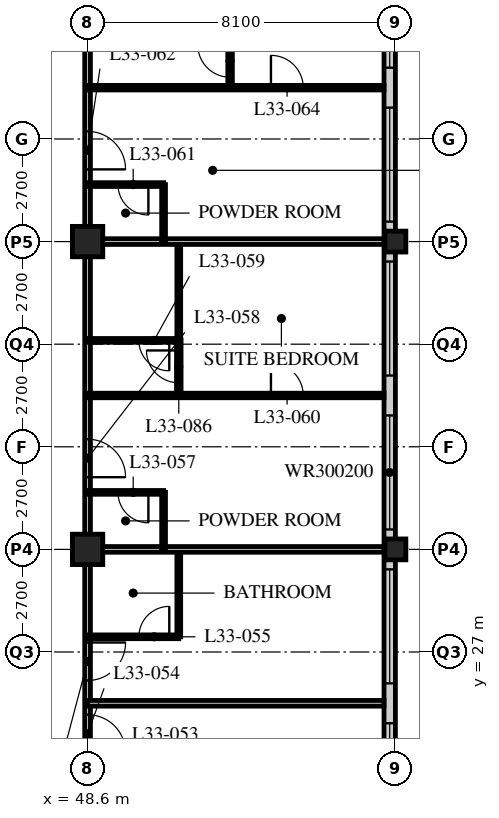
"""IFC4 building model, lengths in metres.
Left out: names, types, materials, properties, quantities, classifications, styles, units other than length and angle.
Written with IfcOpenShell. Run it as: python <this file> out.ifc"""

import sys

from ifc_helpers import new_model, si_unit, direction, frame, frame_2d, origin, origin_2d, place, context, subcontext, project, spatial, rectangle, hollow_rectangle, extrude, element, fill, save


model = new_model("IFC4")
c1 = context("Model", 3, precision=1e-05, world=origin(), true_north=direction((0.0, 1.0)))
c2 = subcontext(c1, "Body", "Model", "MODEL_VIEW")
j1 = project(units=[si_unit("LENGTHUNIT", "METRE"), si_unit("PLANEANGLEUNIT", "RADIAN")], contexts=[c1])
p1 = place(None, origin())
s1 = spatial("IfcSite", under=j1, at=p1, CompositionType="ELEMENT")
p2 = place(p1, origin())
s2 = spatial("IfcBuilding", under=s1, at=p2, CompositionType="ELEMENT")
p3 = place(p2, frame((0.0, 0.0, 130.6)))
s3 = spatial("IfcBuildingStorey", under=s2, at=p3, CompositionType="ELEMENT", Elevation=130.6)
for number, where, z_axis, x_axis in (
    (1, (48.6, 29.7, 0.0), (0.0, 0.0, 1.0), (1.0, 0.0, 0.0)),
    (2, (48.6, 37.8, 0.0), (0.0, 0.0, 1.0), (1.0, 0.0, 0.0)),
):
    element("IfcColumn", number, at=place(p3, frame(where, z_axis=z_axis, x_axis=x_axis)), inside=s3, PredefinedType="COLUMN", context=c2, shape_type="SweptSolid", body=[
        extrude(hollow_rectangle(XDim=0.8, YDim=0.8, WallThickness=0.08, at=origin_2d()), origin(), (0.0, 0.0, 1.0), 3.4),
    ])
for number, where, z_axis, x_axis in (
    (3, (56.7, 29.7, 0.0), (0.0, 0.0, 1.0), (1.0, 0.0, 0.0)),
    (4, (56.7, 37.8, 0.0), (0.0, 0.0, 1.0), (1.0, 0.0, 0.0)),
):
    element("IfcColumn", number, at=place(p3, frame(where, z_axis=z_axis, x_axis=x_axis)), inside=s3, PredefinedType="COLUMN", context=c2, shape_type="SweptSolid", body=[
        extrude(hollow_rectangle(XDim=0.55, YDim=0.55, WallThickness=0.04, at=origin_2d()), origin(), (0.0, 0.0, 1.0), 3.4),
    ])
p4 = place(p3, frame((56.55, 13.8, 0.0), z_axis=(0.0, 0.0, 1.0), x_axis=(0.0, 1.0, 0.0)))
e5 = element("IfcWall", 5, at=p4, inside=s3, PredefinedType="SOLIDWALL", context=c2, shape_type="SweptSolid", body=[
    extrude(rectangle(XDim=32.1, YDim=0.3, at=frame_2d((16.05, 0.0))), origin(), (0.0, 0.0, 1.0), 3.19),
])
p5 = place(p4, frame((0.225, 0.0, 0.9)))
e6 = element("IfcOpeningElement", 6, at=p5, cuts=e5, PredefinedType="OPENING", context=c2, shape_type="SweptSolid", body=[
    extrude(rectangle(XDim=3.0, YDim=2.0, at=frame_2d((1.5, 1.0))), frame((0.0, 0.16, 0.0), z_axis=(0.0, -1.0, 0.0), x_axis=(1.0, 0.0, 0.0)), (0.0, 0.0, 1.0), 0.32),
])
p6 = place(p4, frame((4.275, 0.0, 0.9)))
e7 = element("IfcOpeningElement", 7, at=p6, cuts=e5, PredefinedType="OPENING", context=c2, shape_type="SweptSolid", body=[
    extrude(rectangle(XDim=3.0, YDim=2.0, at=frame_2d((1.5, 1.0))), frame((0.0, 0.16, 0.0), z_axis=(0.0, -1.0, 0.0), x_axis=(1.0, 0.0, 0.0)), (0.0, 0.0, 1.0), 0.32),
])
p7 = place(p4, frame((8.325, 0.0, 0.9)))
e8 = element("IfcOpeningElement", 8, at=p7, cuts=e5, PredefinedType="OPENING", context=c2, shape_type="SweptSolid", body=[
    extrude(rectangle(XDim=3.0, YDim=2.0, at=frame_2d((1.5, 1.0))), frame((0.0, 0.16, 0.0), z_axis=(0.0, -1.0, 0.0), x_axis=(1.0, 0.0, 0.0)), (0.0, 0.0, 1.0), 0.32),
])
p8 = place(p4, frame((12.375, 0.0, 0.9)))
e9 = element("IfcOpeningElement", 9, at=p8, cuts=e5, PredefinedType="OPENING", context=c2, shape_type="SweptSolid", body=[
    extrude(rectangle(XDim=3.0, YDim=2.0, at=frame_2d((1.5, 1.0))), frame((0.0, 0.16, 0.0), z_axis=(0.0, -1.0, 0.0), x_axis=(1.0, 0.0, 0.0)), (0.0, 0.0, 1.0), 0.32),
])
p9 = place(p4, frame((16.425, 0.0, 0.9)))
e10 = element("IfcOpeningElement", 10, at=p9, cuts=e5, PredefinedType="OPENING", context=c2, shape_type="SweptSolid", body=[
    extrude(rectangle(XDim=3.0, YDim=2.0, at=frame_2d((1.5, 1.0))), frame((0.0, 0.16, 0.0), z_axis=(0.0, -1.0, 0.0), x_axis=(1.0, 0.0, 0.0)), (0.0, 0.0, 1.0), 0.32),
])
p10 = place(p4, frame((20.475, 0.0, 0.9)))
e11 = element("IfcOpeningElement", 11, at=p10, cuts=e5, PredefinedType="OPENING", context=c2, shape_type="SweptSolid", body=[
    extrude(rectangle(XDim=3.0, YDim=2.0, at=frame_2d((1.5, 1.0))), frame((0.0, 0.16, 0.0), z_axis=(0.0, -1.0, 0.0), x_axis=(1.0, 0.0, 0.0)), (0.0, 0.0, 1.0), 0.32),
])
p11 = place(p4, frame((24.525, 0.0, 0.9)))
e12 = element("IfcOpeningElement", 12, at=p11, cuts=e5, PredefinedType="OPENING", context=c2, shape_type="SweptSolid", body=[
    extrude(rectangle(XDim=3.0, YDim=2.0, at=frame_2d((1.5, 1.0))), frame((0.0, 0.16, 0.0), z_axis=(0.0, -1.0, 0.0), x_axis=(1.0, 0.0, 0.0)), (0.0, 0.0, 1.0), 0.32),
])
p12 = place(p4, frame((28.575, 0.0, 0.9)))
e13 = element("IfcOpeningElement", 13, at=p12, cuts=e5, PredefinedType="OPENING", context=c2, shape_type="SweptSolid", body=[
    extrude(rectangle(XDim=3.0, YDim=2.0, at=frame_2d((1.5, 1.0))), frame((0.0, 0.16, 0.0), z_axis=(0.0, -1.0, 0.0), x_axis=(1.0, 0.0, 0.0)), (0.0, 0.0, 1.0), 0.32),
])
p13 = place(p3, frame((48.6, 21.6, 0.0), z_axis=(0.0, 0.0, 1.0), x_axis=(0.0, 1.0, 0.0)))
e14 = element("IfcWall", 14, at=p13, inside=s3, PredefinedType="PARTITIONING", context=c2, shape_type="SweptSolid", body=[
    extrude(rectangle(XDim=24.3, YDim=0.15, at=frame_2d((12.15, 0.0))), origin(), (0.0, 0.0, 1.0), 2.578),
])
p14 = place(p13, frame((2.75, 0.0, 0.0)))
e15 = element("IfcOpeningElement", 15, at=p14, cuts=e14, PredefinedType="OPENING", context=c2, shape_type="SweptSolid", body=[
    extrude(rectangle(XDim=1.0, YDim=2.1, at=frame_2d((0.5, 1.05))), frame((0.0, 0.085, 0.0), z_axis=(0.0, -1.0, 0.0), x_axis=(1.0, 0.0, 0.0)), (0.0, 0.0, 1.0), 0.17),
])
p15 = place(p13, frame((4.65, 0.0, 0.0)))
e16 = element("IfcOpeningElement", 16, at=p15, cuts=e14, PredefinedType="OPENING", context=c2, shape_type="SweptSolid", body=[
    extrude(rectangle(XDim=1.0, YDim=2.1, at=frame_2d((0.5, 1.05))), frame((0.0, 0.085, 0.0), z_axis=(0.0, -1.0, 0.0), x_axis=(1.0, 0.0, 0.0)), (0.0, 0.0, 1.0), 0.17),
])
p16 = place(p13, frame((10.0, 0.0, 0.0)))
e17 = element("IfcOpeningElement", 17, at=p16, cuts=e14, PredefinedType="OPENING", context=c2, shape_type="SweptSolid", body=[
    extrude(rectangle(XDim=1.0, YDim=2.1, at=frame_2d((0.5, 1.05))), frame((0.0, 0.085, 0.0), z_axis=(0.0, -1.0, 0.0), x_axis=(1.0, 0.0, 0.0)), (0.0, 0.0, 1.0), 0.17),
])
p17 = place(p13, frame((18.1, 0.0, 0.0)))
e18 = element("IfcOpeningElement", 18, at=p17, cuts=e14, PredefinedType="OPENING", context=c2, shape_type="SweptSolid", body=[
    extrude(rectangle(XDim=1.0, YDim=2.1, at=frame_2d((0.5, 1.05))), frame((0.0, 0.085, 0.0), z_axis=(0.0, -1.0, 0.0), x_axis=(1.0, 0.0, 0.0)), (0.0, 0.0, 1.0), 0.17),
])
p18 = place(p3, frame((48.6, 25.65, 0.0), z_axis=(0.0, 0.0, 1.0), x_axis=(1.0, 0.0, 0.0)))
e19 = element("IfcWall", 19, at=p18, inside=s3, PredefinedType="PARTITIONING", context=c2, shape_type="SweptSolid", body=[
    extrude(rectangle(XDim=7.8, YDim=0.15, at=frame_2d((3.9, 0.0))), origin(), (0.0, 0.0, 1.0), 3.19),
])
p19 = place(p3, frame((51.0, 27.4, 0.0), z_axis=(0.0, 0.0, 1.0), x_axis=(0.0, 1.0, 0.0)))
e20 = element("IfcWall", 20, at=p19, inside=s3, PredefinedType="PARTITIONING", context=c2, shape_type="SweptSolid", body=[
    extrude(rectangle(XDim=2.3, YDim=0.1, at=frame_2d((1.15, 0.0))), origin(), (0.0, 0.0, 1.0), 3.19),
])
p20 = place(p3, frame((48.6, 27.4, 0.0), z_axis=(0.0, 0.0, 1.0), x_axis=(1.0, 0.0, 0.0)))
e21 = element("IfcWall", 21, at=p20, inside=s3, PredefinedType="PARTITIONING", context=c2, shape_type="SweptSolid", body=[
    extrude(rectangle(XDim=2.4, YDim=0.1, at=frame_2d((1.2, 0.0))), origin(), (0.0, 0.0, 1.0), 3.19),
])
p21 = place(p20, frame((1.35, 0.0, 0.0)))
e22 = element("IfcOpeningElement", 22, at=p21, cuts=e21, PredefinedType="OPENING", context=c2, shape_type="SweptSolid", body=[
    extrude(rectangle(XDim=0.8, YDim=2.1, at=frame_2d((0.4, 1.05))), frame((0.0, 0.06, 0.0), z_axis=(0.0, -1.0, 0.0), x_axis=(1.0, 0.0, 0.0)), (0.0, 0.0, 1.0), 0.12),
])
p22 = place(p3, frame((48.6, 29.7, 0.0), z_axis=(0.0, 0.0, 1.0), x_axis=(1.0, 0.0, 0.0)))
e23 = element("IfcWall", 23, at=p22, inside=s3, PredefinedType="PARTITIONING", context=c2, shape_type="SweptSolid", body=[
    extrude(rectangle(XDim=7.8, YDim=0.15, at=frame_2d((3.9, 0.0))), origin(), (0.0, 0.0, 1.0), 2.578),
])
p23 = place(p3, frame((50.6, 29.7, 0.0), z_axis=(0.0, 0.0, 1.0), x_axis=(0.0, 1.0, 0.0)))
e24 = element("IfcWall", 24, at=p23, inside=s3, PredefinedType="PARTITIONING", context=c2, shape_type="SweptSolid", body=[
    extrude(rectangle(XDim=1.5, YDim=0.1, at=frame_2d((0.75, 0.0))), origin(), (0.0, 0.0, 1.0), 3.19),
])
p24 = place(p3, frame((48.6, 31.2, 0.0), z_axis=(0.0, 0.0, 1.0), x_axis=(1.0, 0.0, 0.0)))
e25 = element("IfcWall", 25, at=p24, inside=s3, PredefinedType="PARTITIONING", context=c2, shape_type="SweptSolid", body=[
    extrude(rectangle(XDim=2.0, YDim=0.1, at=frame_2d((1.0, 0.0))), origin(), (0.0, 0.0, 1.0), 3.19),
])
p25 = place(p24, frame((0.8, 0.0, 0.0)))
e26 = element("IfcOpeningElement", 26, at=p25, cuts=e25, PredefinedType="OPENING", context=c2, shape_type="SweptSolid", body=[
    extrude(rectangle(XDim=0.8, YDim=2.1, at=frame_2d((0.4, 1.05))), frame((0.0, 0.06, 0.0), z_axis=(0.0, -1.0, 0.0), x_axis=(1.0, 0.0, 0.0)), (0.0, 0.0, 1.0), 0.12),
])
p26 = place(p3, frame((51.0, 35.2, 0.0), z_axis=(0.0, 0.0, 1.0), x_axis=(0.0, 1.0, 0.0)))
e27 = element("IfcWall", 27, at=p26, inside=s3, PredefinedType="PARTITIONING", context=c2, shape_type="SweptSolid", body=[
    extrude(rectangle(XDim=2.6, YDim=0.1, at=frame_2d((1.3, 0.0))), origin(), (0.0, 0.0, 1.0), 3.19),
])
p27 = place(p3, frame((48.6, 35.2, 0.0), z_axis=(0.0, 0.0, 1.0), x_axis=(1.0, 0.0, 0.0)))
e28 = element("IfcWall", 28, at=p27, inside=s3, PredefinedType="PARTITIONING", context=c2, shape_type="SweptSolid", body=[
    extrude(rectangle(XDim=2.4, YDim=0.1, at=frame_2d((1.2, 0.0))), origin(), (0.0, 0.0, 1.0), 3.19),
])
p28 = place(p27, frame((1.35, 0.0, 0.0)))
e29 = element("IfcOpeningElement", 29, at=p28, cuts=e28, PredefinedType="OPENING", context=c2, shape_type="SweptSolid", body=[
    extrude(rectangle(XDim=0.8, YDim=2.1, at=frame_2d((0.4, 1.05))), frame((0.0, 0.06, 0.0), z_axis=(0.0, -1.0, 0.0), x_axis=(1.0, 0.0, 0.0)), (0.0, 0.0, 1.0), 0.12),
])
p29 = place(p3, frame((48.6, 33.75, 0.0), z_axis=(0.0, 0.0, 1.0), x_axis=(1.0, 0.0, 0.0)))
e30 = element("IfcWall", 30, at=p29, inside=s3, PredefinedType="PARTITIONING", context=c2, shape_type="SweptSolid", body=[
    extrude(rectangle(XDim=7.8, YDim=0.12, at=frame_2d((3.9, 0.0))), origin(), (0.0, 0.0, 1.0), 3.19),
])
p30 = place(p29, frame((4.825, 0.0, 0.0)))
e31 = element("IfcOpeningElement", 31, at=p30, cuts=e30, PredefinedType="OPENING", context=c2, shape_type="SweptSolid", body=[
    extrude(rectangle(XDim=0.85, YDim=2.1, at=frame_2d((0.425, 1.05))), frame((0.0, 0.07, 0.0), z_axis=(0.0, -1.0, 0.0), x_axis=(1.0, 0.0, 0.0)), (0.0, 0.0, 1.0), 0.14),
])
p31 = place(p3, frame((48.6, 37.8, 0.0), z_axis=(0.0, 0.0, 1.0), x_axis=(1.0, 0.0, 0.0)))
e32 = element("IfcWall", 32, at=p31, inside=s3, PredefinedType="PARTITIONING", context=c2, shape_type="SweptSolid", body=[
    extrude(rectangle(XDim=7.8, YDim=0.15, at=frame_2d((3.9, 0.0))), origin(), (0.0, 0.0, 1.0), 2.578),
])
p32 = place(p3, frame((50.6, 37.8, 0.0), z_axis=(0.0, 0.0, 1.0), x_axis=(0.0, 1.0, 0.0)))
e33 = element("IfcWall", 33, at=p32, inside=s3, PredefinedType="PARTITIONING", context=c2, shape_type="SweptSolid", body=[
    extrude(rectangle(XDim=1.5, YDim=0.1, at=frame_2d((0.75, 0.0))), origin(), (0.0, 0.0, 1.0), 3.19),
])
p33 = place(p3, frame((48.6, 39.3, 0.0), z_axis=(0.0, 0.0, 1.0), x_axis=(1.0, 0.0, 0.0)))
e34 = element("IfcWall", 34, at=p33, inside=s3, PredefinedType="PARTITIONING", context=c2, shape_type="SweptSolid", body=[
    extrude(rectangle(XDim=2.0, YDim=0.1, at=frame_2d((1.0, 0.0))), origin(), (0.0, 0.0, 1.0), 3.19),
])
p34 = place(p33, frame((0.8, 0.0, 0.0)))
e35 = element("IfcOpeningElement", 35, at=p34, cuts=e34, PredefinedType="OPENING", context=c2, shape_type="SweptSolid", body=[
    extrude(rectangle(XDim=0.8, YDim=2.1, at=frame_2d((0.4, 1.05))), frame((0.0, 0.06, 0.0), z_axis=(0.0, -1.0, 0.0), x_axis=(1.0, 0.0, 0.0)), (0.0, 0.0, 1.0), 0.12),
])
p35 = place(p3, frame((48.6, 41.85, 0.0), z_axis=(0.0, 0.0, 1.0), x_axis=(1.0, 0.0, 0.0)))
e36 = element("IfcWall", 36, at=p35, inside=s3, PredefinedType="PARTITIONING", context=c2, shape_type="SweptSolid", body=[
    extrude(rectangle(XDim=7.8, YDim=0.12, at=frame_2d((3.9, 0.0))), origin(), (0.0, 0.0, 1.0), 3.19),
])
p36 = place(p35, frame((4.825, 0.0, 0.0)))
e37 = element("IfcOpeningElement", 37, at=p36, cuts=e36, PredefinedType="OPENING", context=c2, shape_type="SweptSolid", body=[
    extrude(rectangle(XDim=0.85, YDim=2.1, at=frame_2d((0.425, 1.05))), frame((0.0, 0.07, 0.0), z_axis=(0.0, -1.0, 0.0), x_axis=(1.0, 0.0, 0.0)), (0.0, 0.0, 1.0), 0.14),
])
p37 = place(p3, frame((51.0, 35.21, 0.0), z_axis=(0.0, 0.0, 1.0), x_axis=(0.0, -1.0, 0.0)))
e38 = element("IfcWall", 38, at=p37, inside=s3, PredefinedType="PARTITIONING", context=c2, shape_type="SweptSolid", body=[
    extrude(rectangle(XDim=1.46, YDim=0.12, at=frame_2d((0.73, 0.0))), origin(), (0.0, 0.0, 1.0), 3.19),
])
p38 = place(p37, frame((0.275, 0.0, 0.0)))
e39 = element("IfcOpeningElement", 39, at=p38, cuts=e38, PredefinedType="OPENING", context=c2, shape_type="SweptSolid", body=[
    extrude(rectangle(XDim=0.85, YDim=2.1, at=frame_2d((0.425, 1.05))), frame((0.0, 0.07, 0.0), z_axis=(0.0, -1.0, 0.0), x_axis=(1.0, 0.0, 0.0)), (0.0, 0.0, 1.0), 0.14),
])
p39 = place(p3, frame((52.35, 45.6, 0.0), z_axis=(0.0, 0.0, 1.0), x_axis=(0.0, -1.0, 0.0)))
e40 = element("IfcWall", 40, at=p39, inside=s3, PredefinedType="PARTITIONING", context=c2, shape_type="SweptSolid", body=[
    extrude(rectangle(XDim=3.75, YDim=0.12, at=frame_2d((1.875, 0.0))), origin(), (0.0, 0.0, 1.0), 3.19),
])
p40 = place(p39, frame((2.625, 0.0, 0.0)))
e41 = element("IfcOpeningElement", 41, at=p40, cuts=e40, PredefinedType="OPENING", context=c2, shape_type="SweptSolid", body=[
    extrude(rectangle(XDim=0.85, YDim=2.1, at=frame_2d((0.425, 1.05))), frame((0.0, 0.07, 0.0), z_axis=(0.0, -1.0, 0.0), x_axis=(1.0, 0.0, 0.0)), (0.0, 0.0, 1.0), 0.14),
])
p41 = place(p7, origin())
e42 = element("IfcWindow", 42, at=p41, inside=s3, PartitioningType="SINGLE_PANEL", PredefinedType="WINDOW", context=c2, shape_type="SweptSolid", body=[
    extrude(rectangle(XDim=3.0, YDim=2.0, at=frame_2d((1.5, 1.0))), frame((0.0, 0.03, 0.0), z_axis=(0.0, -1.0, 0.0), x_axis=(1.0, 0.0, 0.0)), (0.0, 0.0, 1.0), 0.06),
])
fill(e8, e42)
p42 = place(p8, origin())
e43 = element("IfcWindow", 43, at=p42, inside=s3, PartitioningType="SINGLE_PANEL", PredefinedType="WINDOW", context=c2, shape_type="SweptSolid", body=[
    extrude(rectangle(XDim=3.0, YDim=2.0, at=frame_2d((1.5, 1.0))), frame((0.0, 0.03, 0.0), z_axis=(0.0, -1.0, 0.0), x_axis=(1.0, 0.0, 0.0)), (0.0, 0.0, 1.0), 0.06),
])
fill(e9, e43)
p43 = place(p9, origin())
e44 = element("IfcWindow", 44, at=p43, inside=s3, PartitioningType="SINGLE_PANEL", PredefinedType="WINDOW", context=c2, shape_type="SweptSolid", body=[
    extrude(rectangle(XDim=3.0, YDim=2.0, at=frame_2d((1.5, 1.0))), frame((0.0, 0.03, 0.0), z_axis=(0.0, -1.0, 0.0), x_axis=(1.0, 0.0, 0.0)), (0.0, 0.0, 1.0), 0.06),
])
fill(e10, e44)
p44 = place(p10, origin())
e45 = element("IfcWindow", 45, at=p44, inside=s3, PartitioningType="SINGLE_PANEL", PredefinedType="WINDOW", context=c2, shape_type="SweptSolid", body=[
    extrude(rectangle(XDim=3.0, YDim=2.0, at=frame_2d((1.5, 1.0))), frame((0.0, 0.03, 0.0), z_axis=(0.0, -1.0, 0.0), x_axis=(1.0, 0.0, 0.0)), (0.0, 0.0, 1.0), 0.06),
])
fill(e11, e45)
p45 = place(p11, origin())
e46 = element("IfcWindow", 46, at=p45, inside=s3, PartitioningType="SINGLE_PANEL", PredefinedType="WINDOW", context=c2, shape_type="SweptSolid", body=[
    extrude(rectangle(XDim=3.0, YDim=2.0, at=frame_2d((1.5, 1.0))), frame((0.0, 0.03, 0.0), z_axis=(0.0, -1.0, 0.0), x_axis=(1.0, 0.0, 0.0)), (0.0, 0.0, 1.0), 0.06),
])
fill(e12, e46)
p46 = place(p12, origin())
e47 = element("IfcWindow", 47, at=p46, inside=s3, PartitioningType="SINGLE_PANEL", PredefinedType="WINDOW", context=c2, shape_type="SweptSolid", body=[
    extrude(rectangle(XDim=3.0, YDim=2.0, at=frame_2d((1.5, 1.0))), frame((0.0, 0.03, 0.0), z_axis=(0.0, -1.0, 0.0), x_axis=(1.0, 0.0, 0.0)), (0.0, 0.0, 1.0), 0.06),
])
fill(e13, e47)
p47 = place(p14, origin())
e48 = element("IfcDoor", 48, at=p47, inside=s3, OperationType="SINGLE_SWING_RIGHT", PredefinedType="DOOR", context=c2, shape_type="SweptSolid", body=[
    extrude(rectangle(XDim=1.0, YDim=2.1, at=frame_2d((0.5, 1.05))), frame((0.0, 0.025, 0.0), z_axis=(0.0, -1.0, 0.0), x_axis=(1.0, 0.0, 0.0)), (0.0, 0.0, 1.0), 0.05),
])
fill(e15, e48)
p48 = place(p21, origin())
e49 = element("IfcDoor", 49, at=p48, inside=s3, OperationType="SINGLE_SWING_RIGHT", PredefinedType="DOOR", context=c2, shape_type="SweptSolid", body=[
    extrude(rectangle(XDim=0.8, YDim=2.1, at=frame_2d((0.4, 1.05))), frame((0.0, 0.025, 0.0), z_axis=(0.0, -1.0, 0.0), x_axis=(1.0, 0.0, 0.0)), (0.0, 0.0, 1.0), 0.05),
])
fill(e22, e49)
p49 = place(p15, origin())
e50 = element("IfcDoor", 50, at=p49, inside=s3, OperationType="SINGLE_SWING_LEFT", PredefinedType="DOOR", context=c2, shape_type="SweptSolid", body=[
    extrude(rectangle(XDim=1.0, YDim=2.1, at=frame_2d((0.5, 1.05))), frame((0.0, 0.025, 0.0), z_axis=(0.0, -1.0, 0.0), x_axis=(1.0, 0.0, 0.0)), (0.0, 0.0, 1.0), 0.05),
])
fill(e16, e50)
p50 = place(p25, origin())
e51 = element("IfcDoor", 51, at=p50, inside=s3, OperationType="SINGLE_SWING_LEFT", PredefinedType="DOOR", context=c2, shape_type="SweptSolid", body=[
    extrude(rectangle(XDim=0.8, YDim=2.1, at=frame_2d((0.4, 1.05))), frame((0.0, 0.025, 0.0), z_axis=(0.0, -1.0, 0.0), x_axis=(1.0, 0.0, 0.0)), (0.0, 0.0, 1.0), 0.05),
])
fill(e26, e51)
p51 = place(p16, origin())
e52 = element("IfcDoor", 52, at=p51, inside=s3, OperationType="SINGLE_SWING_RIGHT", PredefinedType="DOOR", context=c2, shape_type="SweptSolid", body=[
    extrude(rectangle(XDim=1.0, YDim=2.1, at=frame_2d((0.5, 1.05))), frame((0.0, 0.025, 0.0), z_axis=(0.0, -1.0, 0.0), x_axis=(1.0, 0.0, 0.0)), (0.0, 0.0, 1.0), 0.05),
])
fill(e17, e52)
p52 = place(p28, origin())
e53 = element("IfcDoor", 53, at=p52, inside=s3, OperationType="SINGLE_SWING_LEFT", PredefinedType="DOOR", context=c2, shape_type="SweptSolid", body=[
    extrude(rectangle(XDim=0.8, YDim=2.1, at=frame_2d((0.4, 1.05))), frame((0.0, 0.025, 0.0), z_axis=(0.0, -1.0, 0.0), x_axis=(1.0, 0.0, 0.0)), (0.0, 0.0, 1.0), 0.05),
])
fill(e29, e53)
p53 = place(p30, origin())
e54 = element("IfcDoor", 54, at=p53, inside=s3, OperationType="SINGLE_SWING_LEFT", PredefinedType="DOOR", context=c2, shape_type="SweptSolid", body=[
    extrude(rectangle(XDim=0.85, YDim=2.1, at=frame_2d((0.425, 1.05))), frame((0.0, 0.025, 0.0), z_axis=(0.0, -1.0, 0.0), x_axis=(1.0, 0.0, 0.0)), (0.0, 0.0, 1.0), 0.05),
])
fill(e31, e54)
p54 = place(p34, origin())
e55 = element("IfcDoor", 55, at=p54, inside=s3, OperationType="SINGLE_SWING_LEFT", PredefinedType="DOOR", context=c2, shape_type="SweptSolid", body=[
    extrude(rectangle(XDim=0.8, YDim=2.1, at=frame_2d((0.4, 1.05))), frame((0.0, 0.025, 0.0), z_axis=(0.0, -1.0, 0.0), x_axis=(1.0, 0.0, 0.0)), (0.0, 0.0, 1.0), 0.05),
])
fill(e35, e55)
p55 = place(p17, origin())
e56 = element("IfcDoor", 56, at=p55, inside=s3, OperationType="SINGLE_SWING_RIGHT", PredefinedType="DOOR", context=c2, shape_type="SweptSolid", body=[
    extrude(rectangle(XDim=1.0, YDim=2.1, at=frame_2d((0.5, 1.05))), frame((0.0, 0.025, 0.0), z_axis=(0.0, -1.0, 0.0), x_axis=(1.0, 0.0, 0.0)), (0.0, 0.0, 1.0), 0.05),
])
fill(e18, e56)
p56 = place(p36, origin())
e57 = element("IfcDoor", 57, at=p56, inside=s3, OperationType="SINGLE_SWING_LEFT", PredefinedType="DOOR", context=c2, shape_type="SweptSolid", body=[
    extrude(rectangle(XDim=0.85, YDim=2.1, at=frame_2d((0.425, 1.05))), frame((0.0, 0.025, 0.0), z_axis=(0.0, -1.0, 0.0), x_axis=(1.0, 0.0, 0.0)), (0.0, 0.0, 1.0), 0.05),
])
fill(e37, e57)
p57 = place(p38, origin())
e58 = element("IfcDoor", 58, at=p57, inside=s3, OperationType="SINGLE_SWING_RIGHT", PredefinedType="DOOR", context=c2, shape_type="SweptSolid", body=[
    extrude(rectangle(XDim=0.85, YDim=2.1, at=frame_2d((0.425, 1.05))), frame((0.0, 0.025, 0.0), z_axis=(0.0, -1.0, 0.0), x_axis=(1.0, 0.0, 0.0)), (0.0, 0.0, 1.0), 0.05),
])
fill(e39, e58)
p58 = place(p40, origin())
e59 = element("IfcDoor", 59, at=p58, inside=s3, OperationType="SINGLE_SWING_RIGHT", PredefinedType="DOOR", context=c2, shape_type="SweptSolid", body=[
    extrude(rectangle(XDim=0.85, YDim=2.1, at=frame_2d((0.425, 1.05))), frame((0.0, 0.025, 0.0), z_axis=(0.0, -1.0, 0.0), x_axis=(1.0, 0.0, 0.0)), (0.0, 0.0, 1.0), 0.05),
])
fill(e41, e59)
save(model, sys.argv[1])
